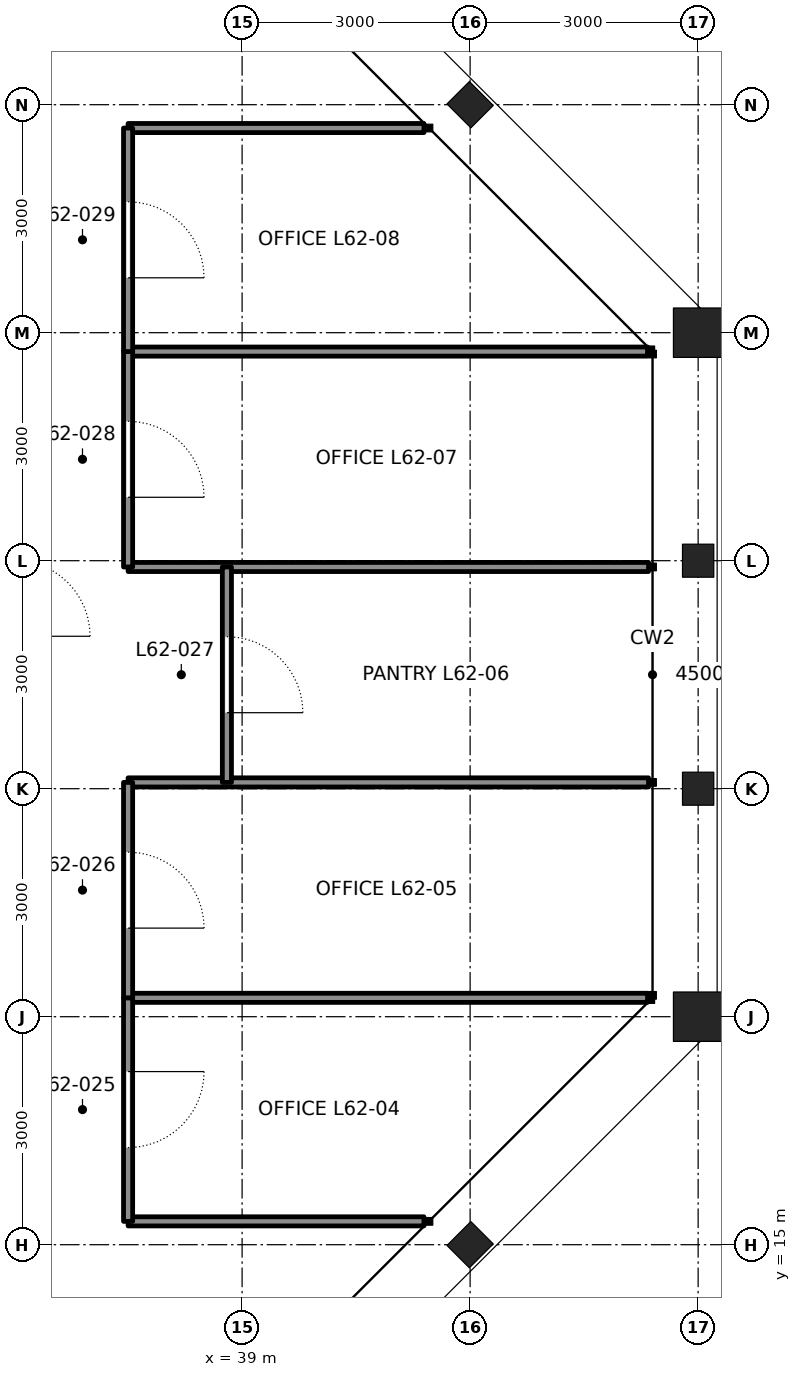
"""IFC4 building model, lengths in metres.
Left out: names, types, materials, properties, quantities, classifications, styles, units other than length and angle.
Written with IfcOpenShell. Run it as: python <this file> out.ifc"""

import sys

from ifc_helpers import new_model, si_unit, direction, frame, frame_2d, origin, origin_2d, place, context, subcontext, project, spatial, rectangle, hollow_rectangle, i_section, extrude, element, fill, save


model = new_model("IFC4")
c1 = context("Model", 3, precision=1e-05, world=origin(), true_north=direction((0.0, 1.0)))
c2 = subcontext(c1, "Body", "Model", "MODEL_VIEW")
j1 = project(units=[si_unit("LENGTHUNIT", "METRE"), si_unit("PLANEANGLEUNIT", "RADIAN")], contexts=[c1])
p1 = place(None, origin())
s1 = spatial("IfcSite", under=j1, at=p1, CompositionType="ELEMENT")
p2 = place(p1, origin())
s2 = spatial("IfcBuilding", under=s1, at=p2, CompositionType="ELEMENT")
p3 = place(p2, frame((0.0, 0.0, 279.0)))
s3 = spatial("IfcBuildingStorey", under=s2, at=p3, CompositionType="ELEMENT", Elevation=279.0)
p4 = place(p3, frame((42.0, 15.0, 0.0), z_axis=(0.0, 0.0, 1.0), x_axis=(0.707106781187, -0.707106781187, 0.0)))
e1 = element("IfcColumn", 1, at=p4, inside=s3, PredefinedType="COLUMN", context=c2, shape_type="SweptSolid", body=[
    extrude(i_section(OverallWidth=0.417, OverallDepth=0.445, WebThickness=0.039, FlangeThickness=0.063, at=origin_2d()), origin(), (0.0, 0.0, 1.0), 4.2),
])
p5 = place(p3, frame((45.0, 18.0, 0.0), z_axis=(0.0, 0.0, 1.0), x_axis=(1.0, 0.0, 0.0)))
e2 = element("IfcColumn", 2, at=p5, inside=s3, PredefinedType="COLUMN", context=c2, shape_type="SweptSolid", body=[
    extrude(hollow_rectangle(XDim=0.65, YDim=0.65, WallThickness=0.065, at=origin_2d()), origin(), (0.0, 0.0, 1.0), 4.2),
])
for number, where, z_axis, x_axis in (
    (3, (45.0, 21.0, 0.0), (0.0, 0.0, 1.0), (1.0, 0.0, 0.0)),
    (4, (45.0, 24.0, 0.0), (0.0, 0.0, 1.0), (1.0, 0.0, 0.0)),
):
    element("IfcColumn", number, at=place(p3, frame(where, z_axis=z_axis, x_axis=x_axis)), inside=s3, PredefinedType="COLUMN", context=c2, shape_type="SweptSolid", body=[
        extrude(i_section(OverallWidth=0.411, OverallDepth=0.434, WebThickness=0.036, FlangeThickness=0.057, at=origin_2d()), origin(), (0.0, 0.0, 1.0), 4.2),
    ])
p6 = place(p3, frame((45.0, 27.0, 0.0), z_axis=(0.0, 0.0, 1.0), x_axis=(1.0, 0.0, 0.0)))
e5 = element("IfcColumn", 5, at=p6, inside=s3, PredefinedType="COLUMN", context=c2, shape_type="SweptSolid", body=[
    extrude(hollow_rectangle(XDim=0.65, YDim=0.65, WallThickness=0.065, at=origin_2d()), origin(), (0.0, 0.0, 1.0), 4.2),
])
p7 = place(p3, frame((42.0, 30.0, 0.0), z_axis=(0.0, 0.0, 1.0), x_axis=(0.707106781187, 0.707106781187, 0.0)))
e6 = element("IfcColumn", 6, at=p7, inside=s3, PredefinedType="COLUMN", context=c2, shape_type="SweptSolid", body=[
    extrude(i_section(OverallWidth=0.417, OverallDepth=0.445, WebThickness=0.039, FlangeThickness=0.063, at=origin_2d()), origin(), (0.0, 0.0, 1.0), 4.2),
])
p8 = place(p3, frame((41.393, 15.307, 0.0), z_axis=(0.0, 0.0, 1.0), x_axis=(-1.0, 0.0, 0.0)))
e7 = element("IfcWall", 7, at=p8, inside=s3, PredefinedType="PARTITIONING", context=c2, shape_type="SweptSolid", body=[
    extrude(rectangle(XDim=3.893, YDim=0.12, at=frame_2d((1.946, 0.0))), origin(), (0.0, 0.0, 1.0), 4.04),
])
p9 = place(p3, frame((44.334, 18.249, 0.0), z_axis=(0.0, 0.0, 1.0), x_axis=(-1.0, 0.0, 0.0)))
e8 = element("IfcWall", 8, at=p9, inside=s3, PredefinedType="PARTITIONING", context=c2, shape_type="SweptSolid", body=[
    extrude(rectangle(XDim=6.834, YDim=0.12, at=frame_2d((3.417, 0.0))), origin(), (0.0, 0.0, 1.0), 4.04),
])
for number, where, z_axis, x_axis in (
    (9, (44.347, 21.083, 0.0), (0.0, 0.0, 1.0), (-1.0, 0.0, 0.0)),
    (10, (44.347, 23.917, 0.0), (0.0, 0.0, 1.0), (-1.0, 0.0, 0.0)),
):
    element("IfcWall", number, at=place(p3, frame(where, z_axis=z_axis, x_axis=x_axis)), inside=s3, PredefinedType="PARTITIONING", context=c2, shape_type="SweptSolid", body=[
        extrude(rectangle(XDim=6.847, YDim=0.12, at=frame_2d((3.424, 0.0))), origin(), (0.0, 0.0, 1.0), 3.357),
    ])
p10 = place(p3, frame((44.334, 26.751, 0.0), z_axis=(0.0, 0.0, 1.0), x_axis=(-1.0, 0.0, 0.0)))
e11 = element("IfcWall", 11, at=p10, inside=s3, PredefinedType="PARTITIONING", context=c2, shape_type="SweptSolid", body=[
    extrude(rectangle(XDim=6.834, YDim=0.12, at=frame_2d((3.417, 0.0))), origin(), (0.0, 0.0, 1.0), 4.04),
])
p11 = place(p3, frame((41.393, 29.693, 0.0), z_axis=(0.0, 0.0, 1.0), x_axis=(-1.0, 0.0, 0.0)))
e12 = element("IfcWall", 12, at=p11, inside=s3, PredefinedType="PARTITIONING", context=c2, shape_type="SweptSolid", body=[
    extrude(rectangle(XDim=3.893, YDim=0.12, at=frame_2d((1.946, 0.0))), origin(), (0.0, 0.0, 1.0), 4.04),
])
p12 = place(p3, frame((37.5, 15.307, 0.0), z_axis=(0.0, 0.0, 1.0), x_axis=(0.0, 1.0, 0.0)))
e13 = element("IfcWall", 13, at=p12, inside=s3, PredefinedType="PARTITIONING", context=c2, shape_type="SweptSolid", body=[
    extrude(rectangle(XDim=2.941, YDim=0.12, at=frame_2d((1.471, 0.0))), origin(), (0.0, 0.0, 1.0), 4.04),
])
p13 = place(p12, frame((0.971, 0.0, 0.0)))
e14 = element("IfcOpeningElement", 14, at=p13, cuts=e13, PredefinedType="OPENING", context=c2, shape_type="SweptSolid", body=[
    extrude(rectangle(XDim=1.0, YDim=2.4, at=frame_2d((0.5, 1.2))), frame((0.0, 0.07, 0.0), z_axis=(0.0, -1.0, 0.0), x_axis=(1.0, 0.0, 0.0)), (0.0, 0.0, 1.0), 0.14),
])
p14 = place(p3, frame((37.5, 18.249, 0.0), z_axis=(0.0, 0.0, 1.0), x_axis=(0.0, 1.0, 0.0)))
e15 = element("IfcWall", 15, at=p14, inside=s3, PredefinedType="PARTITIONING", context=c2, shape_type="SweptSolid", body=[
    extrude(rectangle(XDim=2.834, YDim=0.12, at=frame_2d((1.417, 0.0))), origin(), (0.0, 0.0, 1.0), 4.04),
])
p15 = place(p14, frame((0.917, 0.0, 0.0)))
e16 = element("IfcOpeningElement", 16, at=p15, cuts=e15, PredefinedType="OPENING", context=c2, shape_type="SweptSolid", body=[
    extrude(rectangle(XDim=1.0, YDim=2.4, at=frame_2d((0.5, 1.2))), frame((0.0, 0.07, 0.0), z_axis=(0.0, -1.0, 0.0), x_axis=(1.0, 0.0, 0.0)), (0.0, 0.0, 1.0), 0.14),
])
p16 = place(p3, frame((38.8, 21.083, 0.0), z_axis=(0.0, 0.0, 1.0), x_axis=(0.0, 1.0, 0.0)))
e17 = element("IfcWall", 17, at=p16, inside=s3, PredefinedType="PARTITIONING", context=c2, shape_type="SweptSolid", body=[
    extrude(rectangle(XDim=2.834, YDim=0.12, at=frame_2d((1.417, 0.0))), origin(), (0.0, 0.0, 1.0), 4.04),
])
p17 = place(p16, frame((0.917, 0.0, 0.0)))
e18 = element("IfcOpeningElement", 18, at=p17, cuts=e17, PredefinedType="OPENING", context=c2, shape_type="SweptSolid", body=[
    extrude(rectangle(XDim=1.0, YDim=2.4, at=frame_2d((0.5, 1.2))), frame((0.0, 0.07, 0.0), z_axis=(0.0, -1.0, 0.0), x_axis=(1.0, 0.0, 0.0)), (0.0, 0.0, 1.0), 0.14),
])
p18 = place(p3, frame((37.5, 23.917, 0.0), z_axis=(0.0, 0.0, 1.0), x_axis=(0.0, 1.0, 0.0)))
e19 = element("IfcWall", 19, at=p18, inside=s3, PredefinedType="PARTITIONING", context=c2, shape_type="SweptSolid", body=[
    extrude(rectangle(XDim=2.834, YDim=0.12, at=frame_2d((1.417, 0.0))), origin(), (0.0, 0.0, 1.0), 4.04),
])
p19 = place(p18, frame((0.917, 0.0, 0.0)))
e20 = element("IfcOpeningElement", 20, at=p19, cuts=e19, PredefinedType="OPENING", context=c2, shape_type="SweptSolid", body=[
    extrude(rectangle(XDim=1.0, YDim=2.4, at=frame_2d((0.5, 1.2))), frame((0.0, 0.07, 0.0), z_axis=(0.0, -1.0, 0.0), x_axis=(1.0, 0.0, 0.0)), (0.0, 0.0, 1.0), 0.14),
])
p20 = place(p3, frame((37.5, 26.751, 0.0), z_axis=(0.0, 0.0, 1.0), x_axis=(0.0, 1.0, 0.0)))
e21 = element("IfcWall", 21, at=p20, inside=s3, PredefinedType="PARTITIONING", context=c2, shape_type="SweptSolid", body=[
    extrude(rectangle(XDim=2.941, YDim=0.12, at=frame_2d((1.471, 0.0))), origin(), (0.0, 0.0, 1.0), 4.04),
])
p21 = place(p20, frame((0.971, 0.0, 0.0)))
e22 = element("IfcOpeningElement", 22, at=p21, cuts=e21, PredefinedType="OPENING", context=c2, shape_type="SweptSolid", body=[
    extrude(rectangle(XDim=1.0, YDim=2.4, at=frame_2d((0.5, 1.2))), frame((0.0, 0.07, 0.0), z_axis=(0.0, -1.0, 0.0), x_axis=(1.0, 0.0, 0.0)), (0.0, 0.0, 1.0), 0.14),
])
p22 = place(p13, frame((1.0, 0.0, 0.0), z_axis=(0.0, 0.0, 1.0), x_axis=(-1.0, 0.0, 0.0)))
e23 = element("IfcDoor", 23, at=p22, inside=s3, OperationType="SINGLE_SWING_LEFT", PredefinedType="DOOR", context=c2, shape_type="SweptSolid", body=[
    extrude(rectangle(XDim=1.0, YDim=2.4, at=frame_2d((0.5, 1.2))), frame((0.0, 0.025, 0.0), z_axis=(0.0, -1.0, 0.0), x_axis=(1.0, 0.0, 0.0)), (0.0, 0.0, 1.0), 0.05),
])
fill(e14, e23)
p23 = place(p15, frame((1.0, 0.0, 0.0), z_axis=(0.0, 0.0, 1.0), x_axis=(-1.0, 0.0, 0.0)))
e24 = element("IfcDoor", 24, at=p23, inside=s3, OperationType="SINGLE_SWING_RIGHT", PredefinedType="DOOR", context=c2, shape_type="SweptSolid", body=[
    extrude(rectangle(XDim=1.0, YDim=2.4, at=frame_2d((0.5, 1.2))), frame((0.0, 0.025, 0.0), z_axis=(0.0, -1.0, 0.0), x_axis=(1.0, 0.0, 0.0)), (0.0, 0.0, 1.0), 0.05),
])
fill(e16, e24)
p24 = place(p17, frame((1.0, 0.0, 0.0), z_axis=(0.0, 0.0, 1.0), x_axis=(-1.0, 0.0, 0.0)))
e25 = element("IfcDoor", 25, at=p24, inside=s3, OperationType="SINGLE_SWING_RIGHT", PredefinedType="DOOR", context=c2, shape_type="SweptSolid", body=[
    extrude(rectangle(XDim=1.0, YDim=2.4, at=frame_2d((0.5, 1.2))), frame((0.0, 0.025, 0.0), z_axis=(0.0, -1.0, 0.0), x_axis=(1.0, 0.0, 0.0)), (0.0, 0.0, 1.0), 0.05),
])
fill(e18, e25)
p25 = place(p19, frame((1.0, 0.0, 0.0), z_axis=(0.0, 0.0, 1.0), x_axis=(-1.0, 0.0, 0.0)))
e26 = element("IfcDoor", 26, at=p25, inside=s3, OperationType="SINGLE_SWING_RIGHT", PredefinedType="DOOR", context=c2, shape_type="SweptSolid", body=[
    extrude(rectangle(XDim=1.0, YDim=2.4, at=frame_2d((0.5, 1.2))), frame((0.0, 0.025, 0.0), z_axis=(0.0, -1.0, 0.0), x_axis=(1.0, 0.0, 0.0)), (0.0, 0.0, 1.0), 0.05),
])
fill(e20, e26)
p26 = place(p21, frame((1.0, 0.0, 0.0), z_axis=(0.0, 0.0, 1.0), x_axis=(-1.0, 0.0, 0.0)))
e27 = element("IfcDoor", 27, at=p26, inside=s3, OperationType="SINGLE_SWING_RIGHT", PredefinedType="DOOR", context=c2, shape_type="SweptSolid", body=[
    extrude(rectangle(XDim=1.0, YDim=2.4, at=frame_2d((0.5, 1.2))), frame((0.0, 0.025, 0.0), z_axis=(0.0, -1.0, 0.0), x_axis=(1.0, 0.0, 0.0)), (0.0, 0.0, 1.0), 0.05),
])
fill(e22, e27)
save(model, sys.argv[1])
